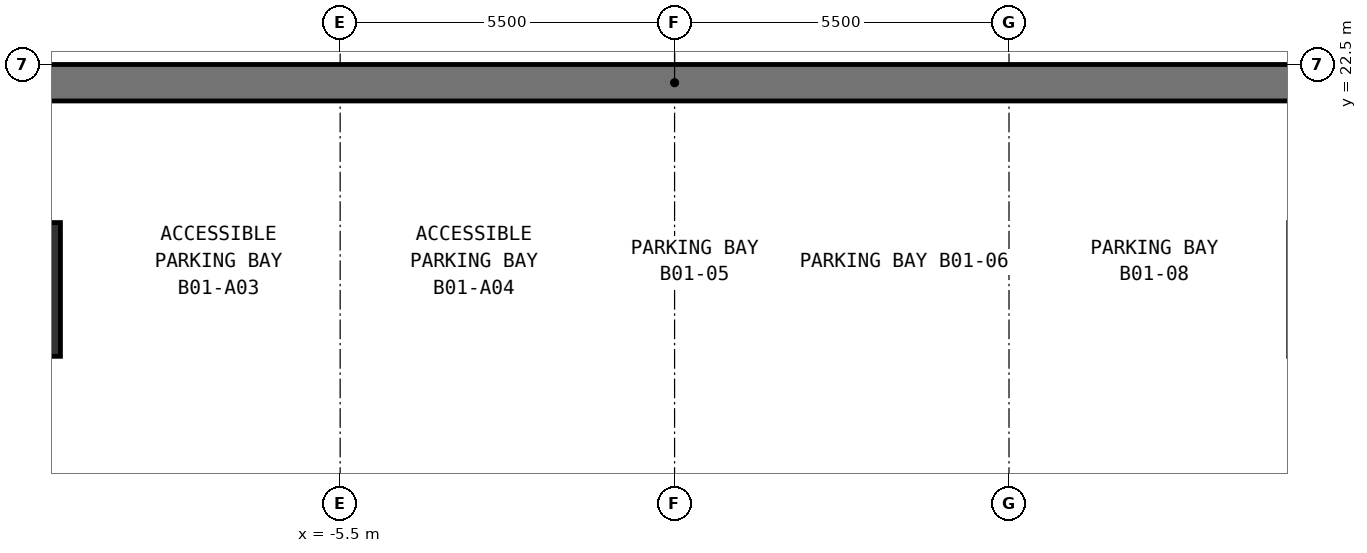
"""IFC4 building model, lengths in metres.
Left out: names, types, materials, properties, quantities, classifications, styles, units other than length and angle.
Written with IfcOpenShell. Run it as: python <this file> out.ifc"""

import sys

from ifc_helpers import new_model, si_unit, direction, frame, frame_2d, origin, origin_2d, place, context, subcontext, project, spatial, rectangle, extrude, element, save


model = new_model("IFC4")
c1 = context("Model", 3, precision=1e-05, world=origin(), true_north=direction((0.0, 1.0)))
c2 = subcontext(c1, "Body", "Model", "MODEL_VIEW")
j1 = project(units=[si_unit("LENGTHUNIT", "METRE"), si_unit("PLANEANGLEUNIT", "RADIAN")], contexts=[c1])
p1 = place(None, origin())
s1 = spatial("IfcSite", under=j1, at=p1, CompositionType="ELEMENT")
p2 = place(p1, origin())
s2 = spatial("IfcBuilding", under=s1, at=p2, CompositionType="ELEMENT")
p3 = place(p2, frame((0.0, 0.0, -4.5)))
s3 = spatial("IfcBuildingStorey", under=s2, at=p3, CompositionType="ELEMENT", Elevation=-4.5)
p4 = place(p3, frame((40.3, 22.2, 0.0), z_axis=(0.0, 0.0, 1.0), x_axis=(-1.0, 0.0, 0.0)))
e1 = element("IfcWall", 1, at=p4, inside=s3, PredefinedType="SOLIDWALL", context=c2, shape_type="SweptSolid", body=[
    extrude(rectangle(XDim=80.6, YDim=0.6, at=frame_2d((40.3, 0.0))), origin(), (0.0, 0.0, 1.0), 4.22),
])
p5 = place(p3, frame((-11.0, 18.8, 0.0), z_axis=(0.0, 0.0, 1.0), x_axis=(1.0, 0.0, 0.0)))
e2 = element("IfcColumn", 2, at=p5, inside=s3, PredefinedType="COLUMN", context=c2, shape_type="SweptSolid", body=[
    extrude(rectangle(XDim=1.8, YDim=2.2, at=origin_2d()), origin(), (0.0, 0.0, 1.0), 4.5),
])
save(model, sys.argv[1])
